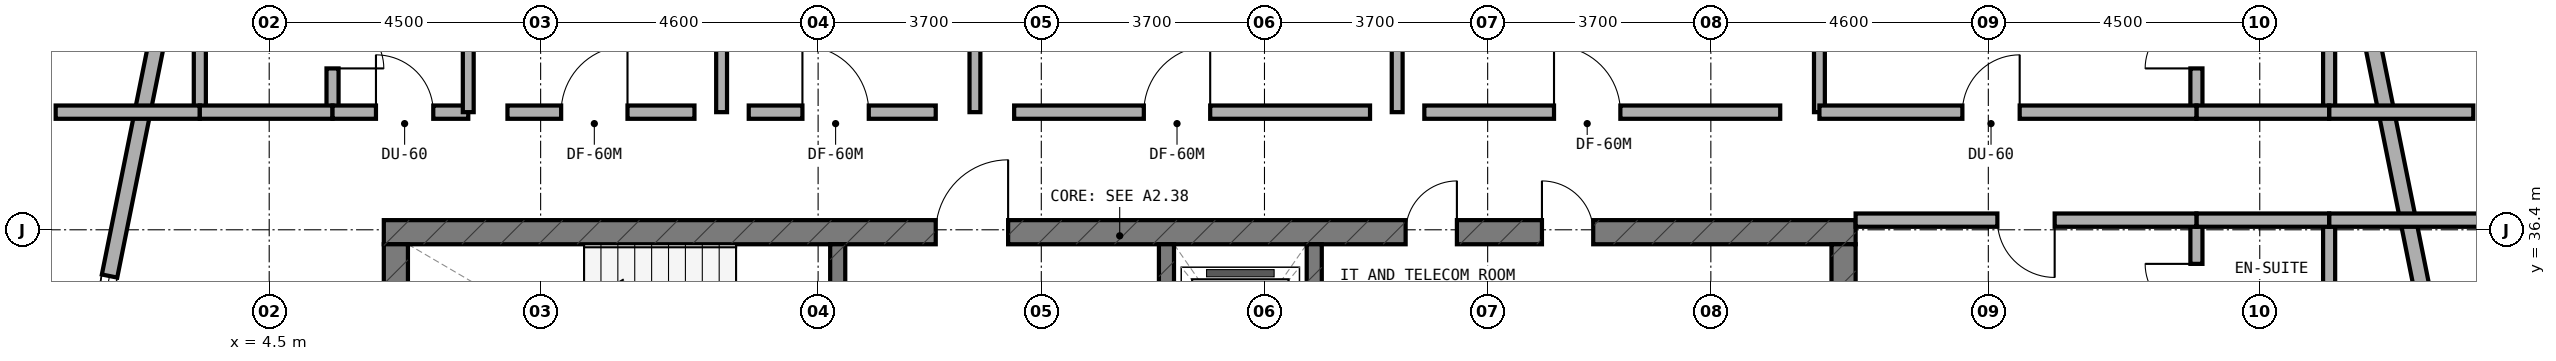
"""IFC4 building model, lengths in metres.
Left out: names, types, materials, properties, quantities, classifications, styles, units other than length and angle.
Written with IfcOpenShell. Run it as: python <this file> out.ifc"""

import sys

from ifc_helpers import new_model, si_unit, direction, frame, frame_2d, origin, place, context, subcontext, project, spatial, rectangle, extrude, element, fill, save


model = new_model("IFC4")
c1 = context("Model", 3, precision=1e-05, world=origin(), true_north=direction((0.0, 1.0)))
c2 = subcontext(c1, "Body", "Model", "MODEL_VIEW")
j1 = project(units=[si_unit("LENGTHUNIT", "METRE"), si_unit("PLANEANGLEUNIT", "RADIAN")], contexts=[c1])
p1 = place(None, origin())
s1 = spatial("IfcSite", under=j1, at=p1, CompositionType="ELEMENT")
p2 = place(p1, origin())
s2 = spatial("IfcBuilding", under=s1, at=p2, CompositionType="ELEMENT")
p3 = place(p2, frame((0.0, 0.0, 169.5)))
s3 = spatial("IfcBuildingStorey", under=s2, at=p3, CompositionType="ELEMENT", Elevation=169.5)
p4 = place(p3, frame((6.4, 36.36, 0.0), z_axis=(0.0, 0.0, 1.0), x_axis=(1.0, 0.0, 0.0)))
e1 = element("IfcWall", 1, at=p4, inside=s3, PredefinedType="SHEAR", context=c2, shape_type="SweptSolid", body=[
    extrude(rectangle(XDim=24.4, YDim=0.4, at=frame_2d((12.2, 0.0))), origin(), (0.0, 0.0, 1.0), 3.5),
])
p5 = place(p4, frame((9.15, 0.0, 0.0)))
e2 = element("IfcOpeningElement", 2, at=p5, cuts=e1, PredefinedType="OPENING", context=c2, shape_type="SweptSolid", body=[
    extrude(rectangle(XDim=1.2, YDim=2.15, at=frame_2d((0.6, 1.075))), frame((0.0, 0.21, 0.0), z_axis=(0.0, -1.0, 0.0), x_axis=(1.0, 0.0, 0.0)), (0.0, 0.0, 1.0), 0.42),
])
p6 = place(p4, frame((19.2, 0.0, 0.0)))
e3 = element("IfcOpeningElement", 3, at=p6, cuts=e1, PredefinedType="OPENING", context=c2, shape_type="SweptSolid", body=[
    extrude(rectangle(XDim=0.85, YDim=2.1, at=frame_2d((0.425, 1.05))), frame((0.0, 0.21, 0.0), z_axis=(0.0, -1.0, 0.0), x_axis=(1.0, 0.0, 0.0)), (0.0, 0.0, 1.0), 0.42),
])
p7 = place(p4, frame((16.94, 0.0, 0.0)))
e4 = element("IfcOpeningElement", 4, at=p7, cuts=e1, PredefinedType="OPENING", context=c2, shape_type="SweptSolid", body=[
    extrude(rectangle(XDim=0.85, YDim=2.1, at=frame_2d((0.425, 1.05))), frame((0.0, 0.21, 0.0), z_axis=(0.0, -1.0, 0.0), x_axis=(1.0, 0.0, 0.0)), (0.0, 0.0, 1.0), 0.42),
])
for number, where, z_axis, x_axis in (
    (5, (6.6, 33.0, 0.0), (0.0, 0.0, 1.0), (0.0, 1.0, 0.0)),
    (6, (30.6, 33.0, 0.0), (0.0, 0.0, 1.0), (0.0, 1.0, 0.0)),
):
    element("IfcWall", number, at=place(p3, frame(where, z_axis=z_axis, x_axis=x_axis)), inside=s3, PredefinedType="SHEAR", context=c2, shape_type="SweptSolid", body=[
        extrude(rectangle(XDim=3.16, YDim=0.4, at=frame_2d((1.58, 0.0))), origin(), (0.0, 0.0, 1.0), 3.5),
    ])
p8 = place(p3, frame((13.925, 33.0, 0.0), z_axis=(0.0, 0.0, 1.0), x_axis=(0.0, 1.0, 0.0)))
e7 = element("IfcWall", 7, at=p8, inside=s3, PredefinedType="STANDARD", context=c2, shape_type="SweptSolid", body=[
    extrude(rectangle(XDim=3.16, YDim=0.25, at=frame_2d((1.58, 0.0))), origin(), (0.0, 0.0, 1.0), 3.18),
])
p9 = place(p8, frame((0.98, 0.0, 0.0)))
e8 = element("IfcOpeningElement", 8, at=p9, cuts=e7, PredefinedType="OPENING", context=c2, shape_type="SweptSolid", body=[
    extrude(rectangle(XDim=1.1, YDim=2.15, at=frame_2d((0.55, 1.075))), frame((0.0, 0.135, 0.0), z_axis=(0.0, -1.0, 0.0), x_axis=(1.0, 0.0, 0.0)), (0.0, 0.0, 1.0), 0.27),
])
p10 = place(p3, frame((19.375, 33.0, 0.0), z_axis=(0.0, 0.0, 1.0), x_axis=(0.0, 1.0, 0.0)))
e9 = element("IfcWall", 9, at=p10, inside=s3, PredefinedType="STANDARD", context=c2, shape_type="SweptSolid", body=[
    extrude(rectangle(XDim=3.16, YDim=0.25, at=frame_2d((1.58, 0.0))), origin(), (0.0, 0.0, 1.0), 3.18),
])
p11 = place(p10, frame((0.98, 0.0, 0.0)))
e10 = element("IfcOpeningElement", 10, at=p11, cuts=e9, PredefinedType="OPENING", context=c2, shape_type="SweptSolid", body=[
    extrude(rectangle(XDim=1.1, YDim=2.15, at=frame_2d((0.55, 1.075))), frame((0.0, 0.135, 0.0), z_axis=(0.0, -1.0, 0.0), x_axis=(1.0, 0.0, 0.0)), (0.0, 0.0, 1.0), 0.27),
])
p12 = place(p3, frame((21.825, 33.0, 0.0), z_axis=(0.0, 0.0, 1.0), x_axis=(0.0, 1.0, 0.0)))
e11 = element("IfcWall", 11, at=p12, inside=s3, PredefinedType="STANDARD", context=c2, shape_type="SweptSolid", body=[
    extrude(rectangle(XDim=3.16, YDim=0.25, at=frame_2d((1.58, 0.0))), origin(), (0.0, 0.0, 1.0), 3.18),
])
p13 = place(p3, frame((41.084, 30.98, 0.0), z_axis=(0.0, 0.0, 1.0), x_axis=(-0.197435082048, 0.980315963543, 0.0)))
e12 = element("IfcWall", 12, at=p13, inside=s3, PredefinedType="STANDARD", context=c2, shape_type="SweptSolid", body=[
    extrude(rectangle(XDim=9.183, YDim=0.26, at=frame_2d((4.591, 0.0))), origin(), (0.0, 0.0, 1.0), 3.18),
])
p14 = place(p13, frame((1.734, 0.0, 0.85)))
e13 = element("IfcOpeningElement", 13, at=p14, cuts=e12, PredefinedType="OPENING", context=c2, shape_type="SweptSolid", body=[
    extrude(rectangle(XDim=2.1, YDim=1.5, at=frame_2d((1.05, 0.75))), frame((0.0, 0.14, 0.0), z_axis=(0.0, -1.0, 0.0), x_axis=(1.0, 0.0, 0.0)), (0.0, 0.0, 1.0), 0.28),
])
p15 = place(p3, frame((2.729, 39.982, 0.0), z_axis=(0.0, 0.0, 1.0), x_axis=(-0.197435082048, -0.980315963543, 0.0)))
e14 = element("IfcWall", 14, at=p15, inside=s3, PredefinedType="STANDARD", context=c2, shape_type="SweptSolid", body=[
    extrude(rectangle(XDim=9.183, YDim=0.26, at=frame_2d((4.591, 0.0))), origin(), (0.0, 0.0, 1.0), 3.18),
])
p16 = place(p15, frame((4.436, 0.0, 0.85)))
e15 = element("IfcOpeningElement", 15, at=p16, cuts=e14, PredefinedType="OPENING", context=c2, shape_type="SweptSolid", body=[
    extrude(rectangle(XDim=2.1, YDim=1.5, at=frame_2d((1.05, 0.75))), frame((0.0, 0.14, 0.0), z_axis=(0.0, -1.0, 0.0), x_axis=(1.0, 0.0, 0.0)), (0.0, 0.0, 1.0), 0.28),
])
p17 = place(p3, frame((5.55, 38.45, 0.0), z_axis=(0.0, 0.0, 1.0), x_axis=(0.0, 1.0, 0.0)))
e16 = element("IfcWall", 16, at=p17, inside=s3, PredefinedType="PLUMBINGWALL", context=c2, shape_type="SweptSolid", body=[
    extrude(rectangle(XDim=2.1, YDim=0.2, at=frame_2d((1.05, 0.0))), origin(), (0.0, 0.0, 1.0), 3.18),
])
p18 = place(p17, frame((0.625, 0.0, 0.0)))
e17 = element("IfcOpeningElement", 17, at=p18, cuts=e16, PredefinedType="OPENING", context=c2, shape_type="SweptSolid", body=[
    extrude(rectangle(XDim=0.85, YDim=2.1, at=frame_2d((0.425, 1.05))), frame((0.0, 0.11, 0.0), z_axis=(0.0, -1.0, 0.0), x_axis=(1.0, 0.0, 0.0)), (0.0, 0.0, 1.0), 0.22),
])
p19 = place(p3, frame((3.35, 38.45, 0.0), z_axis=(0.0, 0.0, 1.0), x_axis=(0.0, 1.0, 0.0)))
e18 = element("IfcWall", 18, at=p19, inside=s3, PredefinedType="PLUMBINGWALL", context=c2, shape_type="SweptSolid", body=[
    extrude(rectangle(XDim=2.1, YDim=0.2, at=frame_2d((1.05, 0.0))), origin(), (0.0, 0.0, 1.0), 3.18),
])
p20 = place(p3, frame((0.96, 38.35, 0.0), z_axis=(0.0, 0.0, 1.0), x_axis=(1.0, 0.0, 0.0)))
e19 = element("IfcWall", 19, at=p20, inside=s3, PredefinedType="SOLIDWALL", context=c2, shape_type="SweptSolid", body=[
    extrude(rectangle(XDim=2.39, YDim=0.22, at=frame_2d((1.195, 0.0))), origin(), (0.0, 0.0, 1.0), 3.18),
])
p21 = place(p3, frame((3.35, 38.35, 0.0), z_axis=(0.0, 0.0, 1.0), x_axis=(1.0, 0.0, 0.0)))
e20 = element("IfcWall", 20, at=p21, inside=s3, PredefinedType="SOLIDWALL", context=c2, shape_type="SweptSolid", body=[
    extrude(rectangle(XDim=2.2, YDim=0.22, at=frame_2d((1.1, 0.0))), origin(), (0.0, 0.0, 1.0), 3.18),
])
p22 = place(p3, frame((5.55, 38.35, 0.0), z_axis=(0.0, 0.0, 1.0), x_axis=(1.0, 0.0, 0.0)))
e21 = element("IfcWall", 21, at=p22, inside=s3, PredefinedType="SOLIDWALL", context=c2, shape_type="SweptSolid", body=[
    extrude(rectangle(XDim=2.25, YDim=0.22, at=frame_2d((1.125, 0.0))), origin(), (0.0, 0.0, 1.0), 2.855),
])
p23 = place(p22, frame((0.72, 0.0, 0.0)))
e22 = element("IfcOpeningElement", 22, at=p23, cuts=e21, PredefinedType="OPENING", context=c2, shape_type="SweptSolid", body=[
    extrude(rectangle(XDim=0.95, YDim=2.1, at=frame_2d((0.475, 1.05))), frame((0.0, 0.12, 0.0), z_axis=(0.0, -1.0, 0.0), x_axis=(1.0, 0.0, 0.0)), (0.0, 0.0, 1.0), 0.24),
])
p24 = place(p3, frame((7.8, 38.35, 0.0), z_axis=(0.0, 0.0, 1.0), x_axis=(0.0, 1.0, 0.0)))
e23 = element("IfcWall", 23, at=p24, inside=s3, PredefinedType="SOLIDWALL", context=c2, shape_type="SweptSolid", body=[
    extrude(rectangle(XDim=5.351, YDim=0.18, at=frame_2d((2.675, 0.0))), origin(), (0.0, 0.0, 1.0), 2.795),
])
p25 = place(p3, frame((12.0, 38.35, 0.0), z_axis=(0.0, 0.0, 1.0), x_axis=(0.0, 1.0, 0.0)))
e24 = element("IfcWall", 24, at=p25, inside=s3, PredefinedType="SOLIDWALL", context=c2, shape_type="SweptSolid", body=[
    extrude(rectangle(XDim=6.197, YDim=0.18, at=frame_2d((3.099, 0.0))), origin(), (0.0, 0.0, 1.0), 2.795),
])
p26 = place(p3, frame((8.45, 38.35, 0.0), z_axis=(0.0, 0.0, 1.0), x_axis=(1.0, 0.0, 0.0)))
e25 = element("IfcWall", 25, at=p26, inside=s3, PredefinedType="SOLIDWALL", context=c2, shape_type="SweptSolid", body=[
    extrude(rectangle(XDim=3.1, YDim=0.22, at=frame_2d((1.55, 0.0))), origin(), (0.0, 0.0, 1.0), 3.18),
])
p27 = place(p26, frame((0.89, 0.0, 0.0)))
e26 = element("IfcOpeningElement", 26, at=p27, cuts=e25, PredefinedType="OPENING", context=c2, shape_type="SweptSolid", body=[
    extrude(rectangle(XDim=1.1, YDim=2.1, at=frame_2d((0.55, 1.05))), frame((0.0, 0.12, 0.0), z_axis=(0.0, -1.0, 0.0), x_axis=(1.0, 0.0, 0.0)), (0.0, 0.0, 1.0), 0.24),
])
p28 = place(p3, frame((12.45, 38.35, 0.0), z_axis=(0.0, 0.0, 1.0), x_axis=(1.0, 0.0, 0.0)))
e27 = element("IfcWall", 27, at=p28, inside=s3, PredefinedType="SOLIDWALL", context=c2, shape_type="SweptSolid", body=[
    extrude(rectangle(XDim=3.1, YDim=0.22, at=frame_2d((1.55, 0.0))), origin(), (0.0, 0.0, 1.0), 3.18),
])
p29 = place(p28, frame((0.89, 0.0, 0.0)))
e28 = element("IfcOpeningElement", 28, at=p29, cuts=e27, PredefinedType="OPENING", context=c2, shape_type="SweptSolid", body=[
    extrude(rectangle(XDim=1.1, YDim=2.1, at=frame_2d((0.55, 1.05))), frame((0.0, 0.12, 0.0), z_axis=(0.0, -1.0, 0.0), x_axis=(1.0, 0.0, 0.0)), (0.0, 0.0, 1.0), 0.24),
])
for number, where, z_axis, x_axis in (
    (29, (16.2, 38.35, 0.0), (0.0, 0.0, 1.0), (0.0, 1.0, 0.0)),
    (30, (23.2, 38.35, 0.0), (0.0, 0.0, 1.0), (0.0, 1.0, 0.0)),
):
    element("IfcWall", number, at=place(p3, frame(where, z_axis=z_axis, x_axis=x_axis)), inside=s3, PredefinedType="SOLIDWALL", context=c2, shape_type="SweptSolid", body=[
        extrude(rectangle(XDim=6.79, YDim=0.18, at=frame_2d((3.395, 0.0))), origin(), (0.0, 0.0, 1.0), 2.795),
    ])
p30 = place(p3, frame((16.85, 38.35, 0.0), z_axis=(0.0, 0.0, 1.0), x_axis=(1.0, 0.0, 0.0)))
e31 = element("IfcWall", 31, at=p30, inside=s3, PredefinedType="SOLIDWALL", context=c2, shape_type="SweptSolid", body=[
    extrude(rectangle(XDim=5.9, YDim=0.22, at=frame_2d((2.95, 0.0))), origin(), (0.0, 0.0, 1.0), 3.18),
])
p31 = place(p30, frame((2.15, 0.0, 0.0)))
e32 = element("IfcOpeningElement", 32, at=p31, cuts=e31, PredefinedType="OPENING", context=c2, shape_type="SweptSolid", body=[
    extrude(rectangle(XDim=1.1, YDim=2.1, at=frame_2d((0.55, 1.05))), frame((0.0, 0.12, 0.0), z_axis=(0.0, -1.0, 0.0), x_axis=(1.0, 0.0, 0.0)), (0.0, 0.0, 1.0), 0.24),
])
p32 = place(p3, frame((23.65, 38.35, 0.0), z_axis=(0.0, 0.0, 1.0), x_axis=(1.0, 0.0, 0.0)))
e33 = element("IfcWall", 33, at=p32, inside=s3, PredefinedType="SOLIDWALL", context=c2, shape_type="SweptSolid", body=[
    extrude(rectangle(XDim=5.9, YDim=0.22, at=frame_2d((2.95, 0.0))), origin(), (0.0, 0.0, 1.0), 2.855),
])
p33 = place(p32, frame((2.15, 0.0, 0.0)))
e34 = element("IfcOpeningElement", 34, at=p33, cuts=e33, PredefinedType="OPENING", context=c2, shape_type="SweptSolid", body=[
    extrude(rectangle(XDim=1.1, YDim=2.1, at=frame_2d((0.55, 1.05))), frame((0.0, 0.12, 0.0), z_axis=(0.0, -1.0, 0.0), x_axis=(1.0, 0.0, 0.0)), (0.0, 0.0, 1.0), 0.24),
])
p34 = place(p3, frame((30.2, 38.35, 0.0), z_axis=(0.0, 0.0, 1.0), x_axis=(0.0, 1.0, 0.0)))
e35 = element("IfcWall", 35, at=p34, inside=s3, PredefinedType="SOLIDWALL", context=c2, shape_type="SweptSolid", body=[
    extrude(rectangle(XDim=6.157, YDim=0.18, at=frame_2d((3.079, 0.0))), origin(), (0.0, 0.0, 1.0), 2.795),
])
p35 = place(p3, frame((36.45, 38.45, 0.0), z_axis=(0.0, 0.0, 1.0), x_axis=(0.0, 1.0, 0.0)))
e36 = element("IfcWall", 36, at=p35, inside=s3, PredefinedType="PLUMBINGWALL", context=c2, shape_type="SweptSolid", body=[
    extrude(rectangle(XDim=2.1, YDim=0.2, at=frame_2d((1.05, 0.0))), origin(), (0.0, 0.0, 1.0), 3.18),
])
p36 = place(p35, frame((0.625, 0.0, 0.0)))
e37 = element("IfcOpeningElement", 37, at=p36, cuts=e36, PredefinedType="OPENING", context=c2, shape_type="SweptSolid", body=[
    extrude(rectangle(XDim=0.85, YDim=2.1, at=frame_2d((0.425, 1.05))), frame((0.0, 0.11, 0.0), z_axis=(0.0, -1.0, 0.0), x_axis=(1.0, 0.0, 0.0)), (0.0, 0.0, 1.0), 0.22),
])
p37 = place(p3, frame((38.65, 38.45, 0.0), z_axis=(0.0, 0.0, 1.0), x_axis=(0.0, 1.0, 0.0)))
e38 = element("IfcWall", 38, at=p37, inside=s3, PredefinedType="PLUMBINGWALL", context=c2, shape_type="SweptSolid", body=[
    extrude(rectangle(XDim=2.1, YDim=0.2, at=frame_2d((1.05, 0.0))), origin(), (0.0, 0.0, 1.0), 3.18),
])
p38 = place(p3, frame((38.65, 38.35, 0.0), z_axis=(0.0, 0.0, 1.0), x_axis=(1.0, 0.0, 0.0)))
e39 = element("IfcWall", 39, at=p38, inside=s3, PredefinedType="SOLIDWALL", context=c2, shape_type="SweptSolid", body=[
    extrude(rectangle(XDim=2.39, YDim=0.22, at=frame_2d((1.195, 0.0))), origin(), (0.0, 0.0, 1.0), 3.18),
])
p39 = place(p3, frame((36.45, 38.35, 0.0), z_axis=(0.0, 0.0, 1.0), x_axis=(1.0, 0.0, 0.0)))
e40 = element("IfcWall", 40, at=p39, inside=s3, PredefinedType="SOLIDWALL", context=c2, shape_type="SweptSolid", body=[
    extrude(rectangle(XDim=2.2, YDim=0.22, at=frame_2d((1.1, 0.0))), origin(), (0.0, 0.0, 1.0), 3.18),
])
p40 = place(p3, frame((30.2, 38.35, 0.0), z_axis=(0.0, 0.0, 1.0), x_axis=(1.0, 0.0, 0.0)))
e41 = element("IfcWall", 41, at=p40, inside=s3, PredefinedType="SOLIDWALL", context=c2, shape_type="SweptSolid", body=[
    extrude(rectangle(XDim=6.25, YDim=0.22, at=frame_2d((3.125, 0.0))), origin(), (0.0, 0.0, 1.0), 2.795),
])
p41 = place(p40, frame((2.37, 0.0, 0.0)))
e42 = element("IfcOpeningElement", 42, at=p41, cuts=e41, PredefinedType="OPENING", context=c2, shape_type="SweptSolid", body=[
    extrude(rectangle(XDim=0.95, YDim=2.1, at=frame_2d((0.475, 1.05))), frame((0.0, 0.12, 0.0), z_axis=(0.0, -1.0, 0.0), x_axis=(1.0, 0.0, 0.0)), (0.0, 0.0, 1.0), 0.24),
])
p42 = place(p3, frame((36.45, 34.36, 0.0), z_axis=(0.0, 0.0, 1.0), x_axis=(0.0, 1.0, 0.0)))
e43 = element("IfcWall", 43, at=p42, inside=s3, PredefinedType="PLUMBINGWALL", context=c2, shape_type="SweptSolid", body=[
    extrude(rectangle(XDim=2.1, YDim=0.2, at=frame_2d((1.05, 0.0))), origin(), (0.0, 0.0, 1.0), 3.18),
])
p43 = place(p42, frame((0.625, 0.0, 0.0)))
e44 = element("IfcOpeningElement", 44, at=p43, cuts=e43, PredefinedType="OPENING", context=c2, shape_type="SweptSolid", body=[
    extrude(rectangle(XDim=0.85, YDim=2.1, at=frame_2d((0.425, 1.05))), frame((0.0, 0.11, 0.0), z_axis=(0.0, -1.0, 0.0), x_axis=(1.0, 0.0, 0.0)), (0.0, 0.0, 1.0), 0.22),
])
p44 = place(p3, frame((38.65, 34.36, 0.0), z_axis=(0.0, 0.0, 1.0), x_axis=(0.0, 1.0, 0.0)))
e45 = element("IfcWall", 45, at=p44, inside=s3, PredefinedType="PLUMBINGWALL", context=c2, shape_type="SweptSolid", body=[
    extrude(rectangle(XDim=2.1, YDim=0.2, at=frame_2d((1.05, 0.0))), origin(), (0.0, 0.0, 1.0), 3.18),
])
p45 = place(p3, frame((38.65, 36.56, 0.0), z_axis=(0.0, 0.0, 1.0), x_axis=(1.0, 0.0, 0.0)))
e46 = element("IfcWall", 46, at=p45, inside=s3, PredefinedType="SOLIDWALL", context=c2, shape_type="SweptSolid", body=[
    extrude(rectangle(XDim=2.55, YDim=0.22, at=frame_2d((1.275, 0.0))), origin(), (0.0, 0.0, 1.0), 3.18),
])
p46 = place(p3, frame((36.45, 36.56, 0.0), z_axis=(0.0, 0.0, 1.0), x_axis=(1.0, 0.0, 0.0)))
e47 = element("IfcWall", 47, at=p46, inside=s3, PredefinedType="SOLIDWALL", context=c2, shape_type="SweptSolid", body=[
    extrude(rectangle(XDim=2.2, YDim=0.22, at=frame_2d((1.1, 0.0))), origin(), (0.0, 0.0, 1.0), 3.18),
])
p47 = place(p3, frame((30.8, 36.56, 0.0), z_axis=(0.0, 0.0, 1.0), x_axis=(1.0, 0.0, 0.0)))
e48 = element("IfcWall", 48, at=p47, inside=s3, PredefinedType="SOLIDWALL", context=c2, shape_type="SweptSolid", body=[
    extrude(rectangle(XDim=5.65, YDim=0.22, at=frame_2d((2.825, 0.0))), origin(), (0.0, 0.0, 1.0), 2.795),
])
p48 = place(p47, frame((2.35, 0.0, 0.0)))
e49 = element("IfcOpeningElement", 49, at=p48, cuts=e48, PredefinedType="OPENING", context=c2, shape_type="SweptSolid", body=[
    extrude(rectangle(XDim=0.95, YDim=2.1, at=frame_2d((0.475, 1.05))), frame((0.0, 0.12, 0.0), z_axis=(0.0, -1.0, 0.0), x_axis=(1.0, 0.0, 0.0)), (0.0, 0.0, 1.0), 0.24),
])
p49 = place(p16, origin())
e50 = element("IfcWindow", 50, at=p49, inside=s3, PartitioningType="SINGLE_PANEL", PredefinedType="WINDOW", context=c2, shape_type="SweptSolid", body=[
    extrude(rectangle(XDim=2.1, YDim=1.5, at=frame_2d((1.05, 0.75))), frame((0.0, 0.03, 0.0), z_axis=(0.0, -1.0, 0.0), x_axis=(1.0, 0.0, 0.0)), (0.0, 0.0, 1.0), 0.06),
])
fill(e15, e50)
p50 = place(p5, origin())
e51 = element("IfcDoor", 51, at=p50, inside=s3, OperationType="SINGLE_SWING_RIGHT", PredefinedType="DOOR", context=c2, shape_type="SweptSolid", body=[
    extrude(rectangle(XDim=1.2, YDim=2.15, at=frame_2d((0.6, 1.075))), frame((0.0, 0.025, 0.0), z_axis=(0.0, -1.0, 0.0), x_axis=(1.0, 0.0, 0.0)), (0.0, 0.0, 1.0), 0.05),
])
fill(e2, e51)
p51 = place(p6, origin())
e52 = element("IfcDoor", 52, at=p51, inside=s3, OperationType="SINGLE_SWING_LEFT", PredefinedType="DOOR", context=c2, shape_type="SweptSolid", body=[
    extrude(rectangle(XDim=0.85, YDim=2.1, at=frame_2d((0.425, 1.05))), frame((0.0, 0.025, 0.0), z_axis=(0.0, -1.0, 0.0), x_axis=(1.0, 0.0, 0.0)), (0.0, 0.0, 1.0), 0.05),
])
fill(e3, e52)
p52 = place(p7, origin())
e53 = element("IfcDoor", 53, at=p52, inside=s3, OperationType="SINGLE_SWING_RIGHT", PredefinedType="DOOR", context=c2, shape_type="SweptSolid", body=[
    extrude(rectangle(XDim=0.85, YDim=2.1, at=frame_2d((0.425, 1.05))), frame((0.0, 0.025, 0.0), z_axis=(0.0, -1.0, 0.0), x_axis=(1.0, 0.0, 0.0)), (0.0, 0.0, 1.0), 0.05),
])
fill(e4, e53)
p53 = place(p18, frame((0.85, 0.0, 0.0), z_axis=(0.0, 0.0, 1.0), x_axis=(-1.0, 0.0, 0.0)))
e54 = element("IfcDoor", 54, at=p53, inside=s3, OperationType="SINGLE_SWING_RIGHT", PredefinedType="DOOR", context=c2, shape_type="SweptSolid", body=[
    extrude(rectangle(XDim=0.85, YDim=2.1, at=frame_2d((0.425, 1.05))), frame((0.0, 0.025, 0.0), z_axis=(0.0, -1.0, 0.0), x_axis=(1.0, 0.0, 0.0)), (0.0, 0.0, 1.0), 0.05),
])
fill(e17, e54)
p54 = place(p23, origin())
e55 = element("IfcDoor", 55, at=p54, inside=s3, OperationType="SINGLE_SWING_LEFT", PredefinedType="DOOR", context=c2, shape_type="SweptSolid", body=[
    extrude(rectangle(XDim=0.95, YDim=2.1, at=frame_2d((0.475, 1.05))), frame((0.0, 0.025, 0.0), z_axis=(0.0, -1.0, 0.0), x_axis=(1.0, 0.0, 0.0)), (0.0, 0.0, 1.0), 0.05),
])
fill(e22, e55)
p55 = place(p27, origin())
e56 = element("IfcDoor", 56, at=p55, inside=s3, OperationType="SINGLE_SWING_RIGHT", PredefinedType="DOOR", context=c2, shape_type="SweptSolid", body=[
    extrude(rectangle(XDim=1.1, YDim=2.1, at=frame_2d((0.55, 1.05))), frame((0.0, 0.025, 0.0), z_axis=(0.0, -1.0, 0.0), x_axis=(1.0, 0.0, 0.0)), (0.0, 0.0, 1.0), 0.05),
])
fill(e26, e56)
p56 = place(p29, origin())
e57 = element("IfcDoor", 57, at=p56, inside=s3, OperationType="SINGLE_SWING_LEFT", PredefinedType="DOOR", context=c2, shape_type="SweptSolid", body=[
    extrude(rectangle(XDim=1.1, YDim=2.1, at=frame_2d((0.55, 1.05))), frame((0.0, 0.025, 0.0), z_axis=(0.0, -1.0, 0.0), x_axis=(1.0, 0.0, 0.0)), (0.0, 0.0, 1.0), 0.05),
])
fill(e28, e57)
p57 = place(p31, origin())
e58 = element("IfcDoor", 58, at=p57, inside=s3, OperationType="SINGLE_SWING_RIGHT", PredefinedType="DOOR", context=c2, shape_type="SweptSolid", body=[
    extrude(rectangle(XDim=1.1, YDim=2.1, at=frame_2d((0.55, 1.05))), frame((0.0, 0.025, 0.0), z_axis=(0.0, -1.0, 0.0), x_axis=(1.0, 0.0, 0.0)), (0.0, 0.0, 1.0), 0.05),
])
fill(e32, e58)
p58 = place(p33, origin())
e59 = element("IfcDoor", 59, at=p58, inside=s3, OperationType="SINGLE_SWING_LEFT", PredefinedType="DOOR", context=c2, shape_type="SweptSolid", body=[
    extrude(rectangle(XDim=1.1, YDim=2.1, at=frame_2d((0.55, 1.05))), frame((0.0, 0.025, 0.0), z_axis=(0.0, -1.0, 0.0), x_axis=(1.0, 0.0, 0.0)), (0.0, 0.0, 1.0), 0.05),
])
fill(e34, e59)
p59 = place(p36, origin())
e60 = element("IfcDoor", 60, at=p59, inside=s3, OperationType="SINGLE_SWING_LEFT", PredefinedType="DOOR", context=c2, shape_type="SweptSolid", body=[
    extrude(rectangle(XDim=0.85, YDim=2.1, at=frame_2d((0.425, 1.05))), frame((0.0, 0.025, 0.0), z_axis=(0.0, -1.0, 0.0), x_axis=(1.0, 0.0, 0.0)), (0.0, 0.0, 1.0), 0.05),
])
fill(e37, e60)
p60 = place(p41, origin())
e61 = element("IfcDoor", 61, at=p60, inside=s3, OperationType="SINGLE_SWING_RIGHT", PredefinedType="DOOR", context=c2, shape_type="SweptSolid", body=[
    extrude(rectangle(XDim=0.95, YDim=2.1, at=frame_2d((0.475, 1.05))), frame((0.0, 0.025, 0.0), z_axis=(0.0, -1.0, 0.0), x_axis=(1.0, 0.0, 0.0)), (0.0, 0.0, 1.0), 0.05),
])
fill(e42, e61)
p61 = place(p43, origin())
e62 = element("IfcDoor", 62, at=p61, inside=s3, OperationType="SINGLE_SWING_RIGHT", PredefinedType="DOOR", context=c2, shape_type="SweptSolid", body=[
    extrude(rectangle(XDim=0.85, YDim=2.1, at=frame_2d((0.425, 1.05))), frame((0.0, 0.025, 0.0), z_axis=(0.0, -1.0, 0.0), x_axis=(1.0, 0.0, 0.0)), (0.0, 0.0, 1.0), 0.05),
])
fill(e44, e62)
p62 = place(p48, frame((0.95, 0.0, 0.0), z_axis=(0.0, 0.0, 1.0), x_axis=(-1.0, 0.0, 0.0)))
e63 = element("IfcDoor", 63, at=p62, inside=s3, OperationType="SINGLE_SWING_LEFT", PredefinedType="DOOR", context=c2, shape_type="SweptSolid", body=[
    extrude(rectangle(XDim=0.95, YDim=2.1, at=frame_2d((0.475, 1.05))), frame((0.0, 0.025, 0.0), z_axis=(0.0, -1.0, 0.0), x_axis=(1.0, 0.0, 0.0)), (0.0, 0.0, 1.0), 0.05),
])
fill(e49, e63)
save(model, sys.argv[1])
